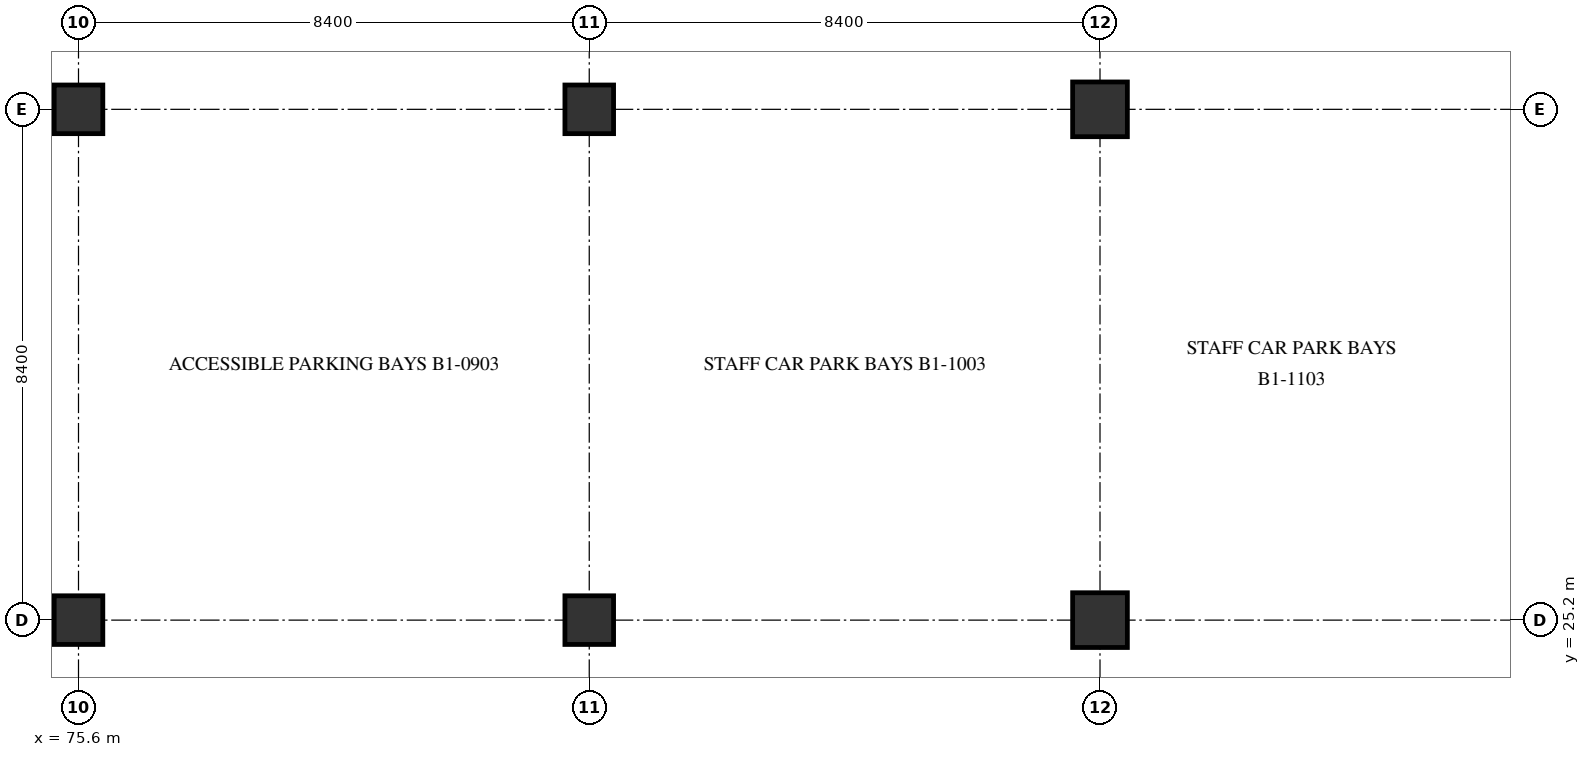
"""IFC4 building model, lengths in metres.
Left out: names, types, materials, properties, quantities, classifications, styles, units other than length and angle.
Written with IfcOpenShell. Run it as: python <this file> out.ifc"""

import sys

from ifc_helpers import new_model, si_unit, direction, frame, origin, origin_2d, place, context, subcontext, project, spatial, rectangle, extrude, element, save


model = new_model("IFC4")
c1 = context("Model", 3, precision=1e-05, world=origin(), true_north=direction((0.0, 1.0)))
c2 = subcontext(c1, "Body", "Model", "MODEL_VIEW")
j1 = project(units=[si_unit("LENGTHUNIT", "METRE"), si_unit("PLANEANGLEUNIT", "RADIAN")], contexts=[c1])
p1 = place(None, origin())
s1 = spatial("IfcSite", under=j1, at=p1, CompositionType="ELEMENT")
p2 = place(p1, origin())
s2 = spatial("IfcBuilding", under=s1, at=p2, CompositionType="ELEMENT")
p3 = place(p2, frame((0.0, 0.0, -5.4)))
s3 = spatial("IfcBuildingStorey", under=s2, at=p3, CompositionType="ELEMENT", Elevation=-5.4)
for number, where, z_axis, x_axis in (
    (1, (75.6, 25.2, 0.0), (0.0, 0.0, 1.0), (1.0, 0.0, 0.0)),
    (2, (75.6, 33.6, 0.0), (0.0, 0.0, 1.0), (1.0, 0.0, 0.0)),
    (3, (84.0, 25.2, 0.0), (0.0, 0.0, 1.0), (1.0, 0.0, 0.0)),
    (4, (84.0, 33.6, 0.0), (0.0, 0.0, 1.0), (1.0, 0.0, 0.0)),
):
    element("IfcColumn", number, at=place(p3, frame(where, z_axis=z_axis, x_axis=x_axis)), inside=s3, PredefinedType="COLUMN", context=c2, shape_type="SweptSolid", body=[
        extrude(rectangle(XDim=0.8, YDim=0.8, at=origin_2d()), origin(), (0.0, 0.0, 1.0), 5.4),
    ])
for number, where, z_axis, x_axis in (
    (5, (92.4, 25.2, 0.0), (0.0, 0.0, 1.0), (1.0, 0.0, 0.0)),
    (6, (92.4, 33.6, 0.0), (0.0, 0.0, 1.0), (1.0, 0.0, 0.0)),
):
    element("IfcColumn", number, at=place(p3, frame(where, z_axis=z_axis, x_axis=x_axis)), inside=s3, PredefinedType="COLUMN", context=c2, shape_type="SweptSolid", body=[
        extrude(rectangle(XDim=0.9, YDim=0.9, at=origin_2d()), origin(), (0.0, 0.0, 1.0), 5.4),
    ])
save(model, sys.argv[1])
